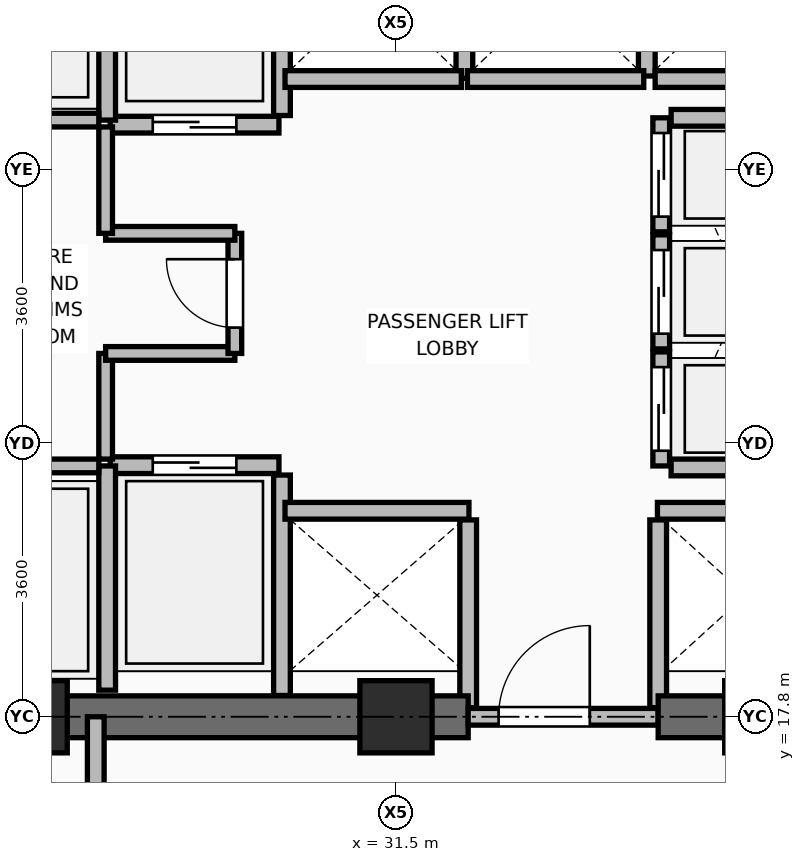
"""IFC4 building model, lengths in metres.
Left out: names, types, materials, properties, quantities, classifications, styles, units other than length and angle.
Written with IfcOpenShell. Run it as: python <this file> out.ifc"""

import sys

from ifc_helpers import new_model, si_unit, direction, frame, frame_2d, origin, origin_2d, place, context, subcontext, project, spatial, rectangle, extrude, element, fill, save


model = new_model("IFC4")
c1 = context("Model", 3, precision=1e-05, world=origin(), true_north=direction((0.0, 1.0)))
c2 = subcontext(c1, "Body", "Model", "MODEL_VIEW")
j1 = project(units=[si_unit("LENGTHUNIT", "METRE"), si_unit("PLANEANGLEUNIT", "RADIAN")], contexts=[c1])
p1 = place(None, origin())
s1 = spatial("IfcSite", under=j1, at=p1, CompositionType="ELEMENT")
p2 = place(p1, origin())
s2 = spatial("IfcBuilding", under=s1, at=p2, CompositionType="ELEMENT")
p3 = place(p2, frame((0.0, 0.0, 142.2)))
s3 = spatial("IfcBuildingStorey", under=s2, at=p3, CompositionType="ELEMENT", Elevation=142.2)
for number, where, z_axis, x_axis in (
    (1, (26.7, 17.8, 0.0), (0.0, 0.0, 1.0), (1.0, 0.0, 0.0)),
    (2, (31.5, 17.8, 0.0), (0.0, 0.0, 1.0), (1.0, 0.0, 0.0)),
    (3, (36.3, 17.8, 0.0), (0.0, 0.0, 1.0), (1.0, 0.0, 0.0)),
):
    element("IfcColumn", number, at=place(p3, frame(where, z_axis=z_axis, x_axis=x_axis)), inside=s3, PredefinedType="COLUMN", context=c2, shape_type="SweptSolid", body=[
        extrude(rectangle(XDim=0.95, YDim=0.95, at=origin_2d()), origin(), (0.0, 0.0, 1.0), 3.75),
    ])
p4 = place(p3, frame((30.0, 18.08, 0.0), z_axis=(0.0, 0.0, 1.0), x_axis=(0.0, 1.0, 0.0)))
e4 = element("IfcWall", 4, at=p4, inside=s3, PredefinedType="PARTITIONING", context=c2, shape_type="SweptSolid", body=[
    extrude(rectangle(XDim=2.9, YDim=0.22, at=frame_2d((1.45, 0.0))), origin(), (0.0, 0.0, 1.0), 3.545),
])
for number, where, z_axis, x_axis in (
    (5, (32.45, 17.92, 0.0), (0.0, 0.0, 1.0), (0.0, 1.0, 0.0)),
    (6, (34.95, 17.92, 0.0), (0.0, 0.0, 1.0), (0.0, 1.0, 0.0)),
):
    element("IfcWall", number, at=place(p3, frame(where, z_axis=z_axis, x_axis=x_axis)), inside=s3, PredefinedType="PARTITIONING", context=c2, shape_type="SweptSolid", body=[
        extrude(rectangle(XDim=2.47, YDim=0.22, at=frame_2d((1.235, 0.0))), origin(), (0.0, 0.0, 1.0), 3.006),
    ])
p5 = place(p3, frame((30.0, 25.71, 0.0), z_axis=(0.0, 0.0, 1.0), x_axis=(0.0, 1.0, 0.0)))
e7 = element("IfcWall", 7, at=p5, inside=s3, PredefinedType="PARTITIONING", context=c2, shape_type="SweptSolid", body=[
    extrude(rectangle(XDim=2.73, YDim=0.22, at=frame_2d((1.365, 0.0))), origin(), (0.0, 0.0, 1.0), 3.545),
])
p6 = place(p3, frame((32.4, 26.2, 0.0), z_axis=(0.0, 0.0, 1.0), x_axis=(0.0, 1.0, 0.0)))
e8 = element("IfcWall", 8, at=p6, inside=s3, PredefinedType="PARTITIONING", context=c2, shape_type="SweptSolid", body=[
    extrude(rectangle(XDim=2.24, YDim=0.22, at=frame_2d((1.12, 0.0))), origin(), (0.0, 0.0, 1.0), 3.545),
])
p7 = place(p3, frame((34.8, 26.23, 0.0), z_axis=(0.0, 0.0, 1.0), x_axis=(0.0, 1.0, 0.0)))
e9 = element("IfcWall", 9, at=p7, inside=s3, PredefinedType="PARTITIONING", context=c2, shape_type="SweptSolid", body=[
    extrude(rectangle(XDim=2.21, YDim=0.22, at=frame_2d((1.105, 0.0))), origin(), (0.0, 0.0, 1.0), 3.545),
])
p8 = place(p3, frame((34.91, 26.19, 0.0), z_axis=(0.0, 0.0, 1.0), x_axis=(1.0, 0.0, 0.0)))
e10 = element("IfcWall", 10, at=p8, inside=s3, PredefinedType="PARTITIONING", context=c2, shape_type="SweptSolid", body=[
    extrude(rectangle(XDim=2.14, YDim=0.22, at=frame_2d((1.07, 0.0))), origin(), (0.0, 0.0, 1.0), 3.545),
])
p9 = place(p3, frame((25.55, 17.8, 0.0), z_axis=(0.0, 0.0, 1.0), x_axis=(1.0, 0.0, 0.0)))
e11 = element("IfcWall", 11, at=p9, inside=s3, PredefinedType="SHEAR", context=c2, shape_type="SweptSolid", body=[
    extrude(rectangle(XDim=6.9, YDim=0.55, at=frame_2d((3.45, 0.0))), origin(), (0.0, 0.0, 1.0), 3.57),
])
p10 = place(p3, frame((32.45, 17.8, 0.0), z_axis=(0.0, 0.0, 1.0), x_axis=(1.0, 0.0, 0.0)))
e12 = element("IfcWall", 12, at=p10, inside=s3, PredefinedType="PARTITIONING", context=c2, shape_type="SweptSolid", body=[
    extrude(rectangle(XDim=2.5, YDim=0.22, at=frame_2d((1.25, 0.0))), origin(), (0.0, 0.0, 1.0), 3.006),
])
p11 = place(p10, frame((0.4, 0.0, 0.0)))
e13 = element("IfcOpeningElement", 13, at=p11, cuts=e12, PredefinedType="OPENING", context=c2, shape_type="SweptSolid", body=[
    extrude(rectangle(XDim=1.2, YDim=2.1, at=frame_2d((0.6, 1.05))), frame((0.0, 0.12, 0.0), z_axis=(0.0, -1.0, 0.0), x_axis=(1.0, 0.0, 0.0)), (0.0, 0.0, 1.0), 0.24),
])
p12 = place(p3, frame((34.95, 17.8, 0.0), z_axis=(0.0, 0.0, 1.0), x_axis=(1.0, 0.0, 0.0)))
e14 = element("IfcWall", 14, at=p12, inside=s3, PredefinedType="SHEAR", context=c2, shape_type="SweptSolid", body=[
    extrude(rectangle(XDim=6.425, YDim=0.55, at=frame_2d((3.212, 0.0))), origin(), (0.0, 0.0, 1.0), 3.57),
])
p13 = place(p3, frame((27.74, 21.11, 0.0), z_axis=(0.0, 0.0, 1.0), x_axis=(1.0, 0.0, 0.0)))
e15 = element("IfcWall", 15, at=p13, inside=s3, PredefinedType="PARTITIONING", context=c2, shape_type="SweptSolid", body=[
    extrude(rectangle(XDim=2.22, YDim=0.22, at=frame_2d((1.11, 0.0))), origin(), (0.0, 0.0, 1.0), 3.55),
])
p14 = place(p13, frame((0.56, 0.0, 0.0)))
e16 = element("IfcOpeningElement", 16, at=p14, cuts=e15, PredefinedType="OPENING", context=c2, shape_type="SweptSolid", body=[
    extrude(rectangle(XDim=1.1, YDim=2.2, at=frame_2d((0.55, 1.1))), frame((0.0, 0.12, 0.0), z_axis=(0.0, -1.0, 0.0), x_axis=(1.0, 0.0, 0.0)), (0.0, 0.0, 1.0), 0.24),
])
p15 = place(p3, frame((27.74, 25.59, 0.0), z_axis=(0.0, 0.0, 1.0), x_axis=(1.0, 0.0, 0.0)))
e17 = element("IfcWall", 17, at=p15, inside=s3, PredefinedType="PARTITIONING", context=c2, shape_type="SweptSolid", body=[
    extrude(rectangle(XDim=2.22, YDim=0.22, at=frame_2d((1.11, 0.0))), origin(), (0.0, 0.0, 1.0), 3.55),
])
p16 = place(p15, frame((0.56, 0.0, 0.0)))
e18 = element("IfcOpeningElement", 18, at=p16, cuts=e17, PredefinedType="OPENING", context=c2, shape_type="SweptSolid", body=[
    extrude(rectangle(XDim=1.1, YDim=2.2, at=frame_2d((0.55, 1.1))), frame((0.0, 0.12, 0.0), z_axis=(0.0, -1.0, 0.0), x_axis=(1.0, 0.0, 0.0)), (0.0, 0.0, 1.0), 0.24),
])
p17 = place(p3, frame((30.04, 20.51, 0.0), z_axis=(0.0, 0.0, 1.0), x_axis=(1.0, 0.0, 0.0)))
e19 = element("IfcWall", 19, at=p17, inside=s3, PredefinedType="PARTITIONING", context=c2, shape_type="SweptSolid", body=[
    extrude(rectangle(XDim=2.42, YDim=0.22, at=frame_2d((1.21, 0.0))), origin(), (0.0, 0.0, 1.0), 3.55),
])
p18 = place(p3, frame((34.94, 20.51, 0.0), z_axis=(0.0, 0.0, 1.0), x_axis=(1.0, 0.0, 0.0)))
e20 = element("IfcWall", 20, at=p18, inside=s3, PredefinedType="PARTITIONING", context=c2, shape_type="SweptSolid", body=[
    extrude(rectangle(XDim=2.24, YDim=0.22, at=frame_2d((1.12, 0.0))), origin(), (0.0, 0.0, 1.0), 3.55),
])
for number, where, z_axis, x_axis in (
    (21, (30.04, 26.19, 0.0), (0.0, 0.0, 1.0), (1.0, 0.0, 0.0)),
    (22, (32.44, 26.19, 0.0), (0.0, 0.0, 1.0), (1.0, 0.0, 0.0)),
):
    element("IfcWall", number, at=place(p3, frame(where, z_axis=z_axis, x_axis=x_axis)), inside=s3, PredefinedType="PARTITIONING", context=c2, shape_type="SweptSolid", body=[
        extrude(rectangle(XDim=2.32, YDim=0.22, at=frame_2d((1.16, 0.0))), origin(), (0.0, 0.0, 1.0), 3.55),
    ])
p19 = place(p3, frame((34.99, 21.1, 0.0), z_axis=(0.0, 0.0, 1.0), x_axis=(0.0, 1.0, 0.0)))
e23 = element("IfcWall", 23, at=p19, inside=s3, PredefinedType="PARTITIONING", context=c2, shape_type="SweptSolid", body=[
    extrude(rectangle(XDim=1.5, YDim=0.22, at=frame_2d((0.75, 0.0))), origin(), (0.0, 0.0, 1.0), 3.55),
])
p20 = place(p19, frame((0.2, 0.0, 0.0)))
e24 = element("IfcOpeningElement", 24, at=p20, cuts=e23, PredefinedType="OPENING", context=c2, shape_type="SweptSolid", body=[
    extrude(rectangle(XDim=1.1, YDim=2.2, at=frame_2d((0.55, 1.1))), frame((0.0, 0.12, 0.0), z_axis=(0.0, -1.0, 0.0), x_axis=(1.0, 0.0, 0.0)), (0.0, 0.0, 1.0), 0.24),
])
p21 = place(p3, frame((34.99, 22.64, 0.0), z_axis=(0.0, 0.0, 1.0), x_axis=(0.0, 1.0, 0.0)))
e25 = element("IfcWall", 25, at=p21, inside=s3, PredefinedType="PARTITIONING", context=c2, shape_type="SweptSolid", body=[
    extrude(rectangle(XDim=1.5, YDim=0.22, at=frame_2d((0.75, 0.0))), origin(), (0.0, 0.0, 1.0), 3.55),
])
p22 = place(p21, frame((0.2, 0.0, 0.0)))
e26 = element("IfcOpeningElement", 26, at=p22, cuts=e25, PredefinedType="OPENING", context=c2, shape_type="SweptSolid", body=[
    extrude(rectangle(XDim=1.1, YDim=2.2, at=frame_2d((0.55, 1.1))), frame((0.0, 0.12, 0.0), z_axis=(0.0, -1.0, 0.0), x_axis=(1.0, 0.0, 0.0)), (0.0, 0.0, 1.0), 0.24),
])
p23 = place(p3, frame((34.99, 24.18, 0.0), z_axis=(0.0, 0.0, 1.0), x_axis=(0.0, 1.0, 0.0)))
e27 = element("IfcWall", 27, at=p23, inside=s3, PredefinedType="PARTITIONING", context=c2, shape_type="SweptSolid", body=[
    extrude(rectangle(XDim=1.5, YDim=0.22, at=frame_2d((0.75, 0.0))), origin(), (0.0, 0.0, 1.0), 3.55),
])
p24 = place(p23, frame((0.2, 0.0, 0.0)))
e28 = element("IfcOpeningElement", 28, at=p24, cuts=e27, PredefinedType="OPENING", context=c2, shape_type="SweptSolid", body=[
    extrude(rectangle(XDim=1.1, YDim=2.2, at=frame_2d((0.55, 1.1))), frame((0.0, 0.12, 0.0), z_axis=(0.0, -1.0, 0.0), x_axis=(1.0, 0.0, 0.0)), (0.0, 0.0, 1.0), 0.24),
])
p25 = place(p3, frame((27.7, 18.15, 0.0), z_axis=(0.0, 0.0, 1.0), x_axis=(0.0, 1.0, 0.0)))
e29 = element("IfcWall", 29, at=p25, inside=s3, PredefinedType="PARTITIONING", context=c2, shape_type="SweptSolid", body=[
    extrude(rectangle(XDim=2.95, YDim=0.22, at=frame_2d((1.475, 0.0))), origin(), (0.0, 0.0, 1.0), 3.55),
])
p26 = place(p3, frame((27.7, 25.65, 0.0), z_axis=(0.0, 0.0, 1.0), x_axis=(0.0, 1.0, 0.0)))
e30 = element("IfcWall", 30, at=p26, inside=s3, PredefinedType="PARTITIONING", context=c2, shape_type="SweptSolid", body=[
    extrude(rectangle(XDim=3.0, YDim=0.22, at=frame_2d((1.5, 0.0))), origin(), (0.0, 0.0, 1.0), 3.55),
])
for number, where, z_axis, x_axis in (
    (31, (35.12, 21.08, 0.0), (0.0, 0.0, 1.0), (1.0, 0.0, 0.0)),
    (32, (35.12, 25.68, 0.0), (0.0, 0.0, 1.0), (1.0, 0.0, 0.0)),
):
    element("IfcWall", number, at=place(p3, frame(where, z_axis=z_axis, x_axis=x_axis)), inside=s3, PredefinedType="PARTITIONING", context=c2, shape_type="SweptSolid", body=[
        extrude(rectangle(XDim=1.94, YDim=0.22, at=frame_2d((0.97, 0.0))), origin(), (0.0, 0.0, 1.0), 3.55),
    ])
for number, where, z_axis, x_axis in (
    (33, (25.89, 21.1, 0.0), (0.0, 0.0, 1.0), (1.0, 0.0, 0.0)),
    (34, (25.89, 25.65, 0.0), (0.0, 0.0, 1.0), (1.0, 0.0, 0.0)),
):
    element("IfcWall", number, at=place(p3, frame(where, z_axis=z_axis, x_axis=x_axis)), inside=s3, PredefinedType="PARTITIONING", context=c2, shape_type="SweptSolid", body=[
        extrude(rectangle(XDim=1.7, YDim=0.18, at=frame_2d((0.85, 0.0))), origin(), (0.0, 0.0, 1.0), 3.55),
    ])
p27 = place(p3, frame((27.68, 21.19, 0.0), z_axis=(0.0, 0.0, 1.0), x_axis=(0.0, 1.0, 0.0)))
e35 = element("IfcWall", 35, at=p27, inside=s3, PredefinedType="PARTITIONING", context=c2, shape_type="SweptSolid", body=[
    extrude(rectangle(XDim=1.39, YDim=0.18, at=frame_2d((0.695, 0.0))), origin(), (0.0, 0.0, 1.0), 3.55),
])
p28 = place(p3, frame((27.68, 22.58, 0.0), z_axis=(0.0, 0.0, 1.0), x_axis=(1.0, 0.0, 0.0)))
e36 = element("IfcWall", 36, at=p28, inside=s3, PredefinedType="PARTITIONING", context=c2, shape_type="SweptSolid", body=[
    extrude(rectangle(XDim=1.7, YDim=0.18, at=frame_2d((0.85, 0.0))), origin(), (0.0, 0.0, 1.0), 3.55),
])
p29 = place(p3, frame((29.38, 22.58, 0.0), z_axis=(0.0, 0.0, 1.0), x_axis=(0.0, 1.0, 0.0)))
e37 = element("IfcWall", 37, at=p29, inside=s3, PredefinedType="PARTITIONING", context=c2, shape_type="SweptSolid", body=[
    extrude(rectangle(XDim=1.58, YDim=0.18, at=frame_2d((0.79, 0.0))), origin(), (0.0, 0.0, 1.0), 3.55),
])
p30 = place(p29, frame((0.34, 0.0, 0.0)))
e38 = element("IfcOpeningElement", 38, at=p30, cuts=e37, PredefinedType="OPENING", context=c2, shape_type="SweptSolid", body=[
    extrude(rectangle(XDim=0.9, YDim=2.1, at=frame_2d((0.45, 1.05))), frame((0.0, 0.1, 0.0), z_axis=(0.0, -1.0, 0.0), x_axis=(1.0, 0.0, 0.0)), (0.0, 0.0, 1.0), 0.2),
])
p31 = place(p3, frame((27.68, 24.16, 0.0), z_axis=(0.0, 0.0, 1.0), x_axis=(1.0, 0.0, 0.0)))
e39 = element("IfcWall", 39, at=p31, inside=s3, PredefinedType="PARTITIONING", context=c2, shape_type="SweptSolid", body=[
    extrude(rectangle(XDim=1.7, YDim=0.18, at=frame_2d((0.85, 0.0))), origin(), (0.0, 0.0, 1.0), 3.55),
])
p32 = place(p3, frame((27.68, 24.16, 0.0), z_axis=(0.0, 0.0, 1.0), x_axis=(0.0, 1.0, 0.0)))
e40 = element("IfcWall", 40, at=p32, inside=s3, PredefinedType="PARTITIONING", context=c2, shape_type="SweptSolid", body=[
    extrude(rectangle(XDim=1.4, YDim=0.18, at=frame_2d((0.7, 0.0))), origin(), (0.0, 0.0, 1.0), 3.55),
])
p33 = place(p3, frame((27.55, 14.35, 0.0), z_axis=(0.0, 0.0, 1.0), x_axis=(0.0, 1.0, 0.0)))
e41 = element("IfcWall", 41, at=p33, inside=s3, PredefinedType="PARTITIONING", context=c2, shape_type="SweptSolid", body=[
    extrude(rectangle(XDim=3.45, YDim=0.22, at=frame_2d((1.725, 0.0))), origin(), (0.0, 0.0, 1.0), 3.006),
])
p34 = place(p33, frame((1.175, 0.0, 0.0)))
e42 = element("IfcOpeningElement", 42, at=p34, cuts=e41, PredefinedType="OPENING", context=c2, shape_type="SweptSolid", body=[
    extrude(rectangle(XDim=1.1, YDim=2.1, at=frame_2d((0.55, 1.05))), frame((0.0, 0.12, 0.0), z_axis=(0.0, -1.0, 0.0), x_axis=(1.0, 0.0, 0.0)), (0.0, 0.0, 1.0), 0.24),
])
p35 = place(p11, origin())
e43 = element("IfcDoor", 43, at=p35, inside=s3, OperationType="SINGLE_SWING_RIGHT", PredefinedType="DOOR", context=c2, shape_type="SweptSolid", body=[
    extrude(rectangle(XDim=1.2, YDim=2.1, at=frame_2d((0.6, 1.05))), frame((0.0, 0.025, 0.0), z_axis=(0.0, -1.0, 0.0), x_axis=(1.0, 0.0, 0.0)), (0.0, 0.0, 1.0), 0.05),
])
fill(e13, e43)
p36 = place(p14, origin())
e44 = element("IfcDoor", 44, at=p36, inside=s3, OperationType="DOUBLE_DOOR_SLIDING", PredefinedType="DOOR", context=c2, shape_type="SweptSolid", body=[
    extrude(rectangle(XDim=1.1, YDim=2.2, at=frame_2d((0.55, 1.1))), frame((0.0, 0.025, 0.0), z_axis=(0.0, -1.0, 0.0), x_axis=(1.0, 0.0, 0.0)), (0.0, 0.0, 1.0), 0.05),
])
fill(e16, e44)
p37 = place(p16, frame((1.1, 0.0, 0.0), z_axis=(0.0, 0.0, 1.0), x_axis=(-1.0, 0.0, 0.0)))
e45 = element("IfcDoor", 45, at=p37, inside=s3, OperationType="DOUBLE_DOOR_SLIDING", PredefinedType="DOOR", context=c2, shape_type="SweptSolid", body=[
    extrude(rectangle(XDim=1.1, YDim=2.2, at=frame_2d((0.55, 1.1))), frame((0.0, 0.025, 0.0), z_axis=(0.0, -1.0, 0.0), x_axis=(1.0, 0.0, 0.0)), (0.0, 0.0, 1.0), 0.05),
])
fill(e18, e45)
p38 = place(p20, origin())
e46 = element("IfcDoor", 46, at=p38, inside=s3, OperationType="DOUBLE_DOOR_SLIDING", PredefinedType="DOOR", context=c2, shape_type="SweptSolid", body=[
    extrude(rectangle(XDim=1.1, YDim=2.2, at=frame_2d((0.55, 1.1))), frame((0.0, 0.025, 0.0), z_axis=(0.0, -1.0, 0.0), x_axis=(1.0, 0.0, 0.0)), (0.0, 0.0, 1.0), 0.05),
])
fill(e24, e46)
p39 = place(p22, origin())
e47 = element("IfcDoor", 47, at=p39, inside=s3, OperationType="DOUBLE_DOOR_SLIDING", PredefinedType="DOOR", context=c2, shape_type="SweptSolid", body=[
    extrude(rectangle(XDim=1.1, YDim=2.2, at=frame_2d((0.55, 1.1))), frame((0.0, 0.025, 0.0), z_axis=(0.0, -1.0, 0.0), x_axis=(1.0, 0.0, 0.0)), (0.0, 0.0, 1.0), 0.05),
])
fill(e26, e47)
p40 = place(p24, origin())
e48 = element("IfcDoor", 48, at=p40, inside=s3, OperationType="DOUBLE_DOOR_SLIDING", PredefinedType="DOOR", context=c2, shape_type="SweptSolid", body=[
    extrude(rectangle(XDim=1.1, YDim=2.2, at=frame_2d((0.55, 1.1))), frame((0.0, 0.025, 0.0), z_axis=(0.0, -1.0, 0.0), x_axis=(1.0, 0.0, 0.0)), (0.0, 0.0, 1.0), 0.05),
])
fill(e28, e48)
p41 = place(p30, origin())
e49 = element("IfcDoor", 49, at=p41, inside=s3, OperationType="SINGLE_SWING_RIGHT", PredefinedType="DOOR", context=c2, shape_type="SweptSolid", body=[
    extrude(rectangle(XDim=0.9, YDim=2.1, at=frame_2d((0.45, 1.05))), frame((0.0, 0.025, 0.0), z_axis=(0.0, -1.0, 0.0), x_axis=(1.0, 0.0, 0.0)), (0.0, 0.0, 1.0), 0.05),
])
fill(e38, e49)
save(model, sys.argv[1])
